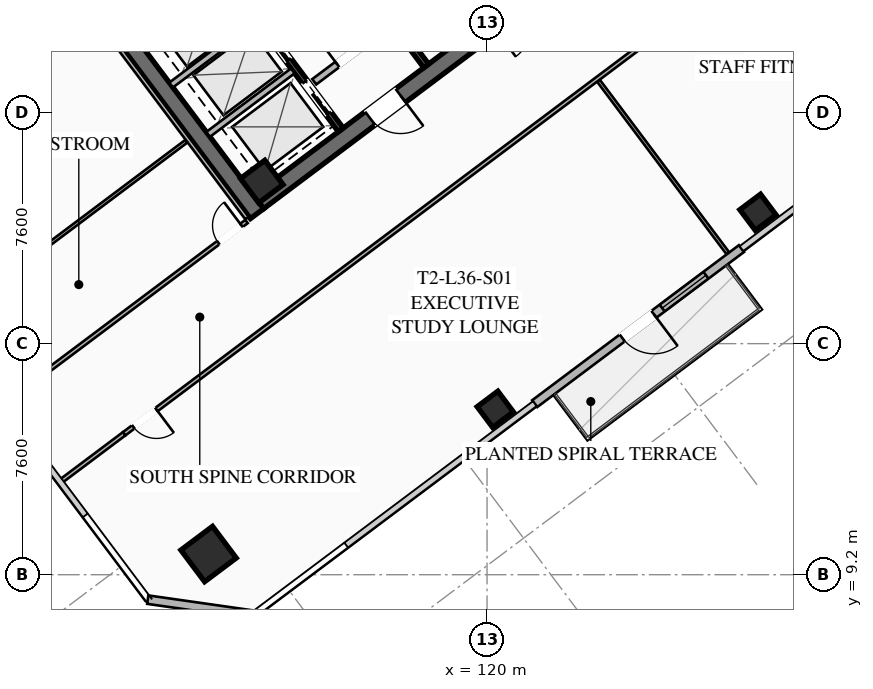
"""IFC4 building model, lengths in metres.
Left out: names, types, materials, properties, quantities, classifications, styles, units other than length and angle.
Written with IfcOpenShell. Run it as: python <this file> out.ifc"""

import sys

from ifc_helpers import new_model, si_unit, direction, frame, frame_2d, origin, origin_2d, place, context, subcontext, project, spatial, rectangle, hollow_rectangle, extrude, element, fill, save


model = new_model("IFC4")
c1 = context("Model", 3, precision=1e-05, world=origin(), true_north=direction((0.0, 1.0)))
c2 = subcontext(c1, "Body", "Model", "MODEL_VIEW")
j1 = project(units=[si_unit("LENGTHUNIT", "METRE"), si_unit("PLANEANGLEUNIT", "RADIAN")], contexts=[c1])
p1 = place(None, origin())
s1 = spatial("IfcSite", under=j1, at=p1, CompositionType="ELEMENT")
p2 = place(p1, origin())
s2 = spatial("IfcBuilding", under=s1, at=p2, CompositionType="ELEMENT")
p3 = place(p2, frame((0.0, 0.0, 135.7)))
s3 = spatial("IfcBuildingStorey", under=s2, at=p3, CompositionType="ELEMENT", Elevation=135.7)
p4 = place(p3, frame((112.436, 21.077, 0.0), z_axis=(0.0, 0.0, 1.0), x_axis=(-0.600005007985, 0.799996243986, 0.0)))
e1 = element("IfcWall", 1, at=p4, inside=s3, PredefinedType="SHEAR", context=c2, shape_type="SweptSolid", body=[
    extrude(rectangle(XDim=15.6, YDim=0.55, at=frame_2d((7.8, 0.0))), origin(), (0.0, 0.0, 1.0), 3.55),
])
p5 = place(p3, frame((124.539, 30.498, 0.0), z_axis=(0.0, 0.0, 1.0), x_axis=(-0.799998054672, -0.600002593761, 0.0)))
e2 = element("IfcWall", 2, at=p5, inside=s3, PredefinedType="SHEAR", context=c2, shape_type="SweptSolid", body=[
    extrude(rectangle(XDim=15.06, YDim=0.55, at=frame_2d((7.53, 0.0))), origin(), (0.0, 0.0, 1.0), 3.55),
])
p6 = place(p5, frame((9.23, 0.0, 0.0)))
e3 = element("IfcOpeningElement", 3, at=p6, cuts=e2, PredefinedType="OPENING", context=c2, shape_type="SweptSolid", body=[
    extrude(rectangle(XDim=1.25, YDim=2.25, at=frame_2d((0.625, 1.125))), frame((0.0, 0.285, 0.0), z_axis=(0.0, -1.0, 0.0), x_axis=(1.0, 0.0, 0.0)), (0.0, 0.0, 1.0), 0.57),
])
p7 = place(p5, frame((4.18, 0.0, 0.0)))
e4 = element("IfcOpeningElement", 4, at=p7, cuts=e2, PredefinedType="OPENING", context=c2, shape_type="SweptSolid", body=[
    extrude(rectangle(XDim=1.25, YDim=2.25, at=frame_2d((0.625, 1.125))), frame((0.0, 0.285, 0.0), z_axis=(0.0, -1.0, 0.0), x_axis=(1.0, 0.0, 0.0)), (0.0, 0.0, 1.0), 0.57),
])
p8 = place(p3, frame((112.59, 22.13, 0.0), z_axis=(0.0, 0.0, 1.0), x_axis=(0.799999996291, 0.600000004945, 0.0)))
e5 = element("IfcColumn", 5, at=p8, inside=s3, PredefinedType="COLUMN", context=c2, shape_type="SweptSolid", body=[
    extrude(hollow_rectangle(XDim=1.0, YDim=1.0, WallThickness=0.04, at=origin_2d()), origin(), (0.0, 0.0, 1.0), 3.37),
])
p9 = place(p3, frame((110.84, 9.88, 0.0), z_axis=(0.0, 0.0, 1.0), x_axis=(0.799999996291, 0.600000004945, 0.0)))
e6 = element("IfcColumn", 6, at=p9, inside=s3, PredefinedType="COLUMN", context=c2, shape_type="SweptSolid", body=[
    extrude(hollow_rectangle(XDim=1.3, YDim=1.3, WallThickness=0.05, at=origin_2d()), origin(), (0.0, 0.0, 1.0), 3.37),
])
for number, where, z_axis, x_axis in (
    (7, (120.27, 14.64, 0.0), (0.0, 0.0, 1.0), (0.8, 0.6, 0.0)),
    (8, (128.91, 21.12, 0.0), (0.0, 0.0, 1.0), (0.8, 0.6, 0.0)),
):
    element("IfcColumn", number, at=place(p3, frame(where, z_axis=z_axis, x_axis=x_axis)), inside=s3, PredefinedType="COLUMN", context=c2, shape_type="SweptSolid", body=[
        extrude(hollow_rectangle(XDim=0.85, YDim=0.85, WallThickness=0.035, at=origin_2d()), origin(), (0.0, 0.0, 1.0), 3.37),
    ])
p10 = place(p3, frame((128.368, 19.926, 0.0), z_axis=(0.0, 0.0, 1.0), x_axis=(-0.799986212866, -0.600018382406, 0.0)))
e9 = element("IfcWall", 9, at=p10, inside=s3, PredefinedType="SOLIDWALL", context=c2, shape_type="SweptSolid", body=[
    extrude(rectangle(XDim=8.5, YDim=0.28, at=frame_2d((4.25, 0.0))), origin(), (0.0, 0.0, 1.0), 3.37),
])
p11 = place(p10, frame((3.6, 0.0, 0.0)))
e10 = element("IfcOpeningElement", 10, at=p11, cuts=e9, PredefinedType="OPENING", context=c2, shape_type="SweptSolid", body=[
    extrude(rectangle(XDim=1.3, YDim=2.15, at=frame_2d((0.65, 1.075))), frame((0.0, 0.15, 0.0), z_axis=(0.0, -1.0, 0.0), x_axis=(1.0, 0.0, 0.0)), (0.0, 0.0, 1.0), 0.3),
])
p12 = place(p10, frame((1.46, 0.0, 0.85)))
e11 = element("IfcOpeningElement", 11, at=p12, cuts=e9, PredefinedType="OPENING", context=c2, shape_type="SweptSolid", body=[
    extrude(rectangle(XDim=1.8, YDim=1.92, at=frame_2d((0.9, 0.96))), frame((0.0, 0.15, 0.0), z_axis=(0.0, -1.0, 0.0), x_axis=(1.0, 0.0, 0.0)), (0.0, 0.0, 1.0), 0.3),
])
p13 = place(p3, frame((112.34, 7.88, 0.0), z_axis=(0.0, 0.0, 1.0), x_axis=(-0.989949493661, 0.141421356237, 0.0)))
e12 = element("IfcWall", 12, at=p13, inside=s3, PredefinedType="SOLIDWALL", context=c2, shape_type="SweptSolid", body=[
    extrude(rectangle(XDim=3.536, YDim=0.28, at=frame_2d((1.768, 0.0))), origin(), (0.0, 0.0, 1.0), 3.37),
])
p14 = place(p3, frame((117.998, 25.936, 0.0), z_axis=(0.0, 0.0, 1.0), x_axis=(-0.600002693989, 0.799997979501, 0.0)))
e13 = element("IfcWall", 13, at=p14, inside=s3, PredefinedType="SHEAR", context=c2, shape_type="SweptSolid", body=[
    extrude(rectangle(XDim=14.5, YDim=0.2, at=frame_2d((7.25, 0.0))), origin(), (0.0, 0.0, 1.0), 3.37),
])
p15 = place(p3, frame((114.316, 25.412, 0.0), z_axis=(0.0, 0.0, 1.0), x_axis=(0.800018601094, 0.59997519774, 0.0)))
e14 = element("IfcWall", 14, at=p15, inside=s3, PredefinedType="SOLIDWALL", context=c2, shape_type="SweptSolid", body=[
    extrude(rectangle(XDim=3.15, YDim=0.22, at=frame_2d((1.575, 0.0))), origin(), (0.0, 0.0, 1.0), 2.723),
])
p16 = place(p15, frame((0.95, 0.0, 0.0)))
e15 = element("IfcOpeningElement", 15, at=p16, cuts=e14, PredefinedType="OPENING", context=c2, shape_type="SweptSolid", body=[
    extrude(rectangle(XDim=1.25, YDim=2.25, at=frame_2d((0.625, 1.125))), frame((0.0, 0.12, 0.0), z_axis=(0.0, -1.0, 0.0), x_axis=(1.0, 0.0, 0.0)), (0.0, 0.0, 1.0), 0.24),
])
p17 = place(p3, frame((115.19, 23.83, 0.0), z_axis=(0.0, 0.0, 1.0), x_axis=(-0.599993943644, 0.800004542231, 0.0)))
e16 = element("IfcWall", 16, at=p17, inside=s3, PredefinedType="SHEAR", context=c2, shape_type="SweptSolid", body=[
    extrude(rectangle(XDim=6.45, YDim=0.2, at=frame_2d((3.225, 0.0))), origin(), (0.0, 0.0, 1.0), 3.37),
])
p18 = place(p17, frame((4.875, 0.0, 0.0)))
e17 = element("IfcOpeningElement", 17, at=p18, cuts=e16, PredefinedType="OPENING", context=c2, shape_type="SweptSolid", body=[
    extrude(rectangle(XDim=1.3, YDim=2.25, at=frame_2d((0.65, 1.125))), frame((0.0, 0.11, 0.0), z_axis=(0.0, -1.0, 0.0), x_axis=(1.0, 0.0, 0.0)), (0.0, 0.0, 1.0), 0.22),
])
p19 = place(p17, frame((2.875, 0.0, 0.0)))
e18 = element("IfcOpeningElement", 18, at=p19, cuts=e16, PredefinedType="OPENING", context=c2, shape_type="SweptSolid", body=[
    extrude(rectangle(XDim=1.3, YDim=2.25, at=frame_2d((0.65, 1.125))), frame((0.0, 0.11, 0.0), z_axis=(0.0, -1.0, 0.0), x_axis=(1.0, 0.0, 0.0)), (0.0, 0.0, 1.0), 0.22),
])
p20 = place(p17, frame((0.675, 0.0, 0.0)))
e19 = element("IfcOpeningElement", 19, at=p20, cuts=e16, PredefinedType="OPENING", context=c2, shape_type="SweptSolid", body=[
    extrude(rectangle(XDim=1.3, YDim=2.25, at=frame_2d((0.65, 1.125))), frame((0.0, 0.11, 0.0), z_axis=(0.0, -1.0, 0.0), x_axis=(1.0, 0.0, 0.0)), (0.0, 0.0, 1.0), 0.22),
])
for number, where, z_axis, x_axis in (
    (20, (110.826, 23.682, 0.0), (0.0, 0.0, 1.0), (0.8, 0.6, 0.0)),
    (21, (109.608, 25.306, 0.0), (0.0, 0.0, 1.0), (0.8, 0.6, 0.0)),
):
    element("IfcWall", number, at=place(p3, frame(where, z_axis=z_axis, x_axis=x_axis)), inside=s3, PredefinedType="SOLIDWALL", context=c2, shape_type="SweptSolid", body=[
        extrude(rectangle(XDim=3.48, YDim=0.2, at=frame_2d((1.74, 0.0))), origin(), (0.0, 0.0, 1.0), 3.37),
    ])
p21 = place(p3, frame((133.102, 32.614, 0.0), z_axis=(0.0, 0.0, 1.0), x_axis=(-0.8, -0.6, 0.0)))
e22 = element("IfcWall", 22, at=p21, inside=s3, PredefinedType="PARTITIONING", context=c2, shape_type="SweptSolid", body=[
    extrude(rectangle(XDim=31.3, YDim=0.135, at=frame_2d((15.65, 0.0))), origin(), (0.0, 0.0, 1.0), 2.723),
])
p22 = place(p21, frame((29.97, 0.0, 0.0)))
e23 = element("IfcOpeningElement", 23, at=p22, cuts=e22, PredefinedType="OPENING", context=c2, shape_type="SweptSolid", body=[
    extrude(rectangle(XDim=0.95, YDim=2.05, at=frame_2d((0.475, 1.025))), frame((0.0, 0.077, 0.0), z_axis=(0.0, -1.0, 0.0), x_axis=(1.0, 0.0, 0.0)), (0.0, 0.0, 1.0), 0.155),
])
p23 = place(p21, frame((0.38, 0.0, 0.0)))
e24 = element("IfcOpeningElement", 24, at=p23, cuts=e22, PredefinedType="OPENING", context=c2, shape_type="SweptSolid", body=[
    extrude(rectangle(XDim=0.95, YDim=2.05, at=frame_2d((0.475, 1.025))), frame((0.0, 0.077, 0.0), z_axis=(0.0, -1.0, 0.0), x_axis=(1.0, 0.0, 0.0)), (0.0, 0.0, 1.0), 0.155),
])
p24 = place(p3, frame((105.958, 12.256, 0.0), z_axis=(0.0, 0.0, 1.0), x_axis=(0.80002227902, 0.599970293491, 0.0)))
e25 = element("IfcWall", 25, at=p24, inside=s3, PredefinedType="PARTITIONING", context=c2, shape_type="SweptSolid", body=[
    extrude(rectangle(XDim=2.63, YDim=0.135, at=frame_2d((1.315, 0.0))), origin(), (0.0, 0.0, 1.0), 2.723),
])
p25 = place(p3, frame((127.918, 19.776, 0.0), z_axis=(0.0, 0.0, 1.0), x_axis=(-0.6, 0.8, 0.0)))
e26 = element("IfcWall", 26, at=p25, inside=s3, PredefinedType="PARTITIONING", context=c2, shape_type="SweptSolid", body=[
    extrude(rectangle(XDim=7.08, YDim=0.11, at=frame_2d((3.54, 0.0))), origin(), (0.0, 0.0, 1.0), 2.723),
])
p26 = place(p3, frame((112.104, 20.928, 0.0), z_axis=(0.0, 0.0, 1.0), x_axis=(-0.599994940075, 0.800003794918, 0.0)))
e27 = element("IfcWall", 27, at=p26, inside=s3, PredefinedType="PARTITIONING", context=c2, shape_type="SweptSolid", body=[
    extrude(rectangle(XDim=15.44, YDim=0.135, at=frame_2d((7.72, 0.0))), origin(), (0.0, 0.0, 1.0), 2.723),
])
p27 = place(p3, frame((104.056, 14.792, 0.0), z_axis=(0.0, 0.0, 1.0), x_axis=(0.800002918023, 0.599996109283, 0.0)))
e28 = element("IfcWall", 28, at=p27, inside=s3, PredefinedType="PARTITIONING", context=c2, shape_type="SweptSolid", body=[
    extrude(rectangle(XDim=10.04, YDim=0.135, at=frame_2d((5.02, 0.0))), origin(), (0.0, 0.0, 1.0), 2.723),
])
p28 = place(p27, frame((8.88, 0.0, 0.0)))
e29 = element("IfcOpeningElement", 29, at=p28, cuts=e28, PredefinedType="OPENING", context=c2, shape_type="SweptSolid", body=[
    extrude(rectangle(XDim=0.95, YDim=2.05, at=frame_2d((0.475, 1.025))), frame((0.0, 0.077, 0.0), z_axis=(0.0, -1.0, 0.0), x_axis=(1.0, 0.0, 0.0)), (0.0, 0.0, 1.0), 0.155),
])
p29 = place(p3, frame((102.076, 17.432, 0.0), z_axis=(0.0, 0.0, 1.0), x_axis=(0.799991245945, 0.600011671896, 0.0)))
e30 = element("IfcWall", 30, at=p29, inside=s3, PredefinedType="PARTITIONING", context=c2, shape_type="SweptSolid", body=[
    extrude(rectangle(XDim=10.04, YDim=0.11, at=frame_2d((5.02, 0.0))), origin(), (0.0, 0.0, 1.0), 2.723),
])
p30 = place(p11, origin())
e31 = element("IfcDoor", 31, at=p30, inside=s3, OperationType="SINGLE_SWING_LEFT", PredefinedType="DOOR", context=c2, shape_type="SweptSolid", body=[
    extrude(rectangle(XDim=1.3, YDim=2.15, at=frame_2d((0.65, 1.075))), frame((0.0, 0.025, 0.0), z_axis=(0.0, -1.0, 0.0), x_axis=(1.0, 0.0, 0.0)), (0.0, 0.0, 1.0), 0.05),
])
fill(e10, e31)
p31 = place(p12, origin())
e32 = element("IfcWindow", 32, at=p31, inside=s3, PartitioningType="SINGLE_PANEL", PredefinedType="WINDOW", context=c2, shape_type="SweptSolid", body=[
    extrude(rectangle(XDim=1.8, YDim=1.92, at=frame_2d((0.9, 0.96))), frame((0.0, 0.03, 0.0), z_axis=(0.0, -1.0, 0.0), x_axis=(1.0, 0.0, 0.0)), (0.0, 0.0, 1.0), 0.06),
])
fill(e11, e32)
p32 = place(p6, origin())
e33 = element("IfcDoor", 33, at=p32, inside=s3, OperationType="SINGLE_SWING_LEFT", PredefinedType="DOOR", context=c2, shape_type="SweptSolid", body=[
    extrude(rectangle(XDim=1.25, YDim=2.25, at=frame_2d((0.625, 1.125))), frame((0.0, 0.025, 0.0), z_axis=(0.0, -1.0, 0.0), x_axis=(1.0, 0.0, 0.0)), (0.0, 0.0, 1.0), 0.05),
])
fill(e3, e33)
p33 = place(p16, origin())
e34 = element("IfcDoor", 34, at=p33, inside=s3, OperationType="SINGLE_SWING_LEFT", PredefinedType="DOOR", context=c2, shape_type="SweptSolid", body=[
    extrude(rectangle(XDim=1.25, YDim=2.25, at=frame_2d((0.625, 1.125))), frame((0.0, 0.025, 0.0), z_axis=(0.0, -1.0, 0.0), x_axis=(1.0, 0.0, 0.0)), (0.0, 0.0, 1.0), 0.05),
])
fill(e15, e34)
p34 = place(p22, origin())
e35 = element("IfcDoor", 35, at=p34, inside=s3, OperationType="SINGLE_SWING_LEFT", PredefinedType="DOOR", context=c2, shape_type="SweptSolid", body=[
    extrude(rectangle(XDim=0.95, YDim=2.05, at=frame_2d((0.475, 1.025))), frame((0.0, 0.025, 0.0), z_axis=(0.0, -1.0, 0.0), x_axis=(1.0, 0.0, 0.0)), (0.0, 0.0, 1.0), 0.05),
])
fill(e23, e35)
p35 = place(p28, origin())
e36 = element("IfcDoor", 36, at=p35, inside=s3, OperationType="SINGLE_SWING_RIGHT", PredefinedType="DOOR", context=c2, shape_type="SweptSolid", body=[
    extrude(rectangle(XDim=0.95, YDim=2.05, at=frame_2d((0.475, 1.025))), frame((0.0, 0.025, 0.0), z_axis=(0.0, -1.0, 0.0), x_axis=(1.0, 0.0, 0.0)), (0.0, 0.0, 1.0), 0.05),
])
fill(e29, e36)
p36 = place(p19, origin())
e37 = element("IfcDoor", 37, at=p36, inside=s3, OperationType="SLIDING_TO_LEFT", PredefinedType="DOOR", context=c2, shape_type="SweptSolid", body=[
    extrude(rectangle(XDim=1.3, YDim=2.25, at=frame_2d((0.65, 1.125))), frame((0.0, 0.025, 0.0), z_axis=(0.0, -1.0, 0.0), x_axis=(1.0, 0.0, 0.0)), (0.0, 0.0, 1.0), 0.05),
])
fill(e18, e37)
p37 = place(p20, origin())
e38 = element("IfcDoor", 38, at=p37, inside=s3, OperationType="SLIDING_TO_LEFT", PredefinedType="DOOR", context=c2, shape_type="SweptSolid", body=[
    extrude(rectangle(XDim=1.3, YDim=2.25, at=frame_2d((0.65, 1.125))), frame((0.0, 0.025, 0.0), z_axis=(0.0, -1.0, 0.0), x_axis=(1.0, 0.0, 0.0)), (0.0, 0.0, 1.0), 0.05),
])
fill(e19, e38)
save(model, sys.argv[1])
